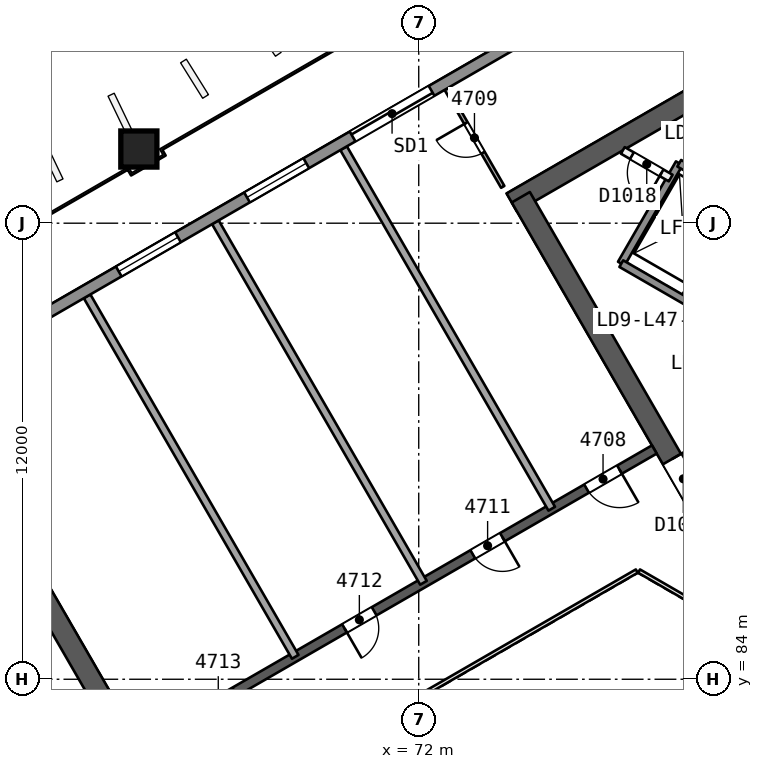
"""IFC4 building model, lengths in metres.
Left out: names, types, materials, properties, quantities, classifications, styles, units other than length and angle.
Written with IfcOpenShell. Run it as: python <this file> out.ifc"""

import sys

from ifc_helpers import new_model, si_unit, direction, frame, frame_2d, origin, origin_2d, place, context, subcontext, project, spatial, rectangle, extrude, element, fill, save


model = new_model("IFC4")
c1 = context("Model", 3, precision=1e-05, world=origin(), true_north=direction((0.0, 1.0)))
c2 = subcontext(c1, "Body", "Model", "MODEL_VIEW")
j1 = project(units=[si_unit("LENGTHUNIT", "METRE"), si_unit("PLANEANGLEUNIT", "RADIAN")], contexts=[c1])
p1 = place(None, origin())
s1 = spatial("IfcSite", under=j1, at=p1, CompositionType="ELEMENT")
p2 = place(p1, origin())
s2 = spatial("IfcBuilding", under=s1, at=p2, CompositionType="ELEMENT")
p3 = place(p2, frame((0.0, 0.0, 193.3)))
s3 = spatial("IfcBuildingStorey", under=s2, at=p3, CompositionType="ELEMENT", Elevation=193.3)
p4 = place(p3, frame((65.682, 80.0, 0.0), z_axis=(0.0, 0.0, 1.0), x_axis=(-0.500000202252, 0.866025287014, 0.0)))
e1 = element("IfcWall", 1, at=p4, inside=s3, PredefinedType="SHEAR", context=c2, shape_type="SweptSolid", body=[
    extrude(rectangle(XDim=10.221, YDim=0.55, at=frame_2d((5.111, 0.0))), origin(), (0.0, 0.0, 1.0), 3.7),
])
p5 = place(p4, frame((0.791, 0.0, 0.0)))
e2 = element("IfcOpeningElement", 2, at=p5, cuts=e1, PredefinedType="OPENING", context=c2, shape_type="SweptSolid", body=[
    extrude(rectangle(XDim=1.2, YDim=2.1, at=frame_2d((0.6, 1.05))), frame((0.0, 0.286, 0.0), z_axis=(0.0, -1.0, 0.0), x_axis=(1.0, 0.0, 0.0)), (0.0, 0.0, 1.0), 0.571),
])
p6 = place(p3, frame((86.723, 103.633, 0.0), z_axis=(0.0, 0.0, 1.0), x_axis=(-0.866023530946, -0.500003243837, 0.0)))
e3 = element("IfcWall", 3, at=p6, inside=s3, PredefinedType="SHEAR", context=c2, shape_type="SweptSolid", body=[
    extrude(rectangle(XDim=14.175, YDim=0.55, at=frame_2d((7.087, 0.0))), origin(), (0.0, 0.0, 1.0), 3.7),
])
p7 = place(p3, frame((74.686, 96.683, 0.0), z_axis=(0.0, 0.0, 1.0), x_axis=(0.499997818338, -0.866026663364, 0.0)))
e4 = element("IfcWall", 4, at=p7, inside=s3, PredefinedType="SHEAR", context=c2, shape_type="SweptSolid", body=[
    extrude(rectangle(XDim=10.105, YDim=0.55, at=frame_2d((5.052, 0.0))), origin(), (0.0, 0.0, 1.0), 3.7),
])
p8 = place(p7, frame((7.955, 0.0, 0.0)))
e5 = element("IfcOpeningElement", 5, at=p8, cuts=e4, PredefinedType="OPENING", context=c2, shape_type="SweptSolid", body=[
    extrude(rectangle(XDim=1.2, YDim=2.1, at=frame_2d((0.6, 1.05))), frame((0.0, 0.286, 0.0), z_axis=(0.0, -1.0, 0.0), x_axis=(1.0, 0.0, 0.0)), (0.0, 0.0, 1.0), 0.571),
])
p9 = place(p3, frame((78.2, 90.046, 0.0), z_axis=(0.0, 0.0, 1.0), x_axis=(-0.866026492143, -0.499998114903, 0.0)))
e6 = element("IfcWall", 6, at=p9, inside=s3, PredefinedType="SHEAR", context=c2, shape_type="SweptSolid", body=[
    extrude(rectangle(XDim=15.588, YDim=0.25, at=frame_2d((7.794, 0.0))), origin(), (0.0, 0.0, 1.0), 3.3),
])
p10 = place(p9, frame((1.059, 0.0, 0.0)))
e7 = element("IfcOpeningElement", 7, at=p10, cuts=e6, PredefinedType="OPENING", context=c2, shape_type="SweptSolid", body=[
    extrude(rectangle(XDim=1.0, YDim=2.1, at=frame_2d((0.5, 1.05))), frame((0.0, 0.135, 0.0), z_axis=(0.0, -1.0, 0.0), x_axis=(1.0, 0.0, 0.0)), (0.0, 0.0, 1.0), 0.271),
])
p11 = place(p9, frame((4.616, 0.0, 0.0)))
e8 = element("IfcOpeningElement", 8, at=p11, cuts=e6, PredefinedType="OPENING", context=c2, shape_type="SweptSolid", body=[
    extrude(rectangle(XDim=0.9, YDim=2.1, at=frame_2d((0.45, 1.05))), frame((0.0, 0.135, 0.0), z_axis=(0.0, -1.0, 0.0), x_axis=(1.0, 0.0, 0.0)), (0.0, 0.0, 1.0), 0.271),
])
p12 = place(p9, frame((8.513, 0.0, 0.0)))
e9 = element("IfcOpeningElement", 9, at=p12, cuts=e6, PredefinedType="OPENING", context=c2, shape_type="SweptSolid", body=[
    extrude(rectangle(XDim=0.9, YDim=2.1, at=frame_2d((0.45, 1.05))), frame((0.0, 0.135, 0.0), z_axis=(0.0, -1.0, 0.0), x_axis=(1.0, 0.0, 0.0)), (0.0, 0.0, 1.0), 0.271),
])
p13 = place(p9, frame((12.75, 0.0, 0.0)))
e10 = element("IfcOpeningElement", 10, at=p13, cuts=e6, PredefinedType="OPENING", context=c2, shape_type="SweptSolid", body=[
    extrude(rectangle(XDim=1.0, YDim=2.1, at=frame_2d((0.5, 1.05))), frame((0.0, 0.135, 0.0), z_axis=(0.0, -1.0, 0.0), x_axis=(1.0, 0.0, 0.0)), (0.0, 0.0, 1.0), 0.271),
])
p14 = place(p3, frame((64.624, 97.973, 0.0), z_axis=(0.010093620709, -0.017482414954, 0.999796221231), x_axis=(0.866020200589, 0.50000901209, 8.5616e-08)))
e11 = element("IfcColumn", 11, at=p14, inside=s3, PredefinedType="COLUMN", context=c2, shape_type="SweptSolid", body=[
    extrude(rectangle(XDim=0.95, YDim=0.95, at=origin_2d()), origin(), (0.0, 0.0, 1.0), 3.701),
])
p15 = place(p3, frame((74.21, 96.956, 0.0), z_axis=(0.0, 0.0, 1.0), x_axis=(-0.49997816789, 0.866038008192, 0.0)))
e12 = element("IfcWall", 12, at=p15, inside=s3, PredefinedType="PARTITIONING", context=c2, shape_type="SweptSolid", body=[
    extrude(rectangle(XDim=2.975, YDim=0.1, at=frame_2d((1.488, 0.0))), origin(), (0.0, 0.0, 1.0), 3.3),
])
p16 = place(p15, frame((1.038, 0.0, 0.0)))
e13 = element("IfcOpeningElement", 13, at=p16, cuts=e12, PredefinedType="OPENING", context=c2, shape_type="SweptSolid", body=[
    extrude(rectangle(XDim=0.9, YDim=2.1, at=frame_2d((0.45, 1.05))), frame((0.0, 0.061, 0.0), z_axis=(0.0, -1.0, 0.0), x_axis=(1.0, 0.0, 0.0)), (0.0, 0.0, 1.0), 0.121),
])
for number, where, z_axis, x_axis in (
    (14, (70.023, 97.974, 0.0), (0.0, 0.0, 1.0), (0.5, -0.866, 0.0)),
    (15, (66.648, 96.025, 0.0), (0.0, 0.0, 1.0), (0.5, -0.866, 0.0)),
    (16, (63.273, 94.076, 0.0), (0.0, 0.0, 1.0), (0.5, -0.866, 0.0)),
):
    element("IfcWall", number, at=place(p3, frame(where, z_axis=z_axis, x_axis=x_axis)), inside=s3, PredefinedType="PARTITIONING", context=c2, shape_type="SweptSolid", body=[
        extrude(rectangle(XDim=10.954, YDim=0.2, at=frame_2d((5.477, 0.0))), origin(), (0.0, 0.0, 1.0), 3.3),
    ])
p17 = place(p3, frame((43.232, 82.678, 0.0), z_axis=(0.0, 0.0, 1.0), x_axis=(0.866025125259, 0.500000482419, 0.0)))
e17 = element("IfcWall", 17, at=p17, inside=s3, PredefinedType="SOLIDWALL", context=c2, shape_type="SweptSolid", body=[
    extrude(rectangle(XDim=52.347, YDim=0.3, at=frame_2d((26.173, 0.0))), origin(), (0.0, 0.0, 1.0), 3.3),
])
p18 = place(p17, frame((31.209, 0.0, 0.0)))
e18 = element("IfcOpeningElement", 18, at=p18, cuts=e17, PredefinedType="OPENING", context=c2, shape_type="SweptSolid", body=[
    extrude(rectangle(XDim=2.4, YDim=2.4, at=frame_2d((1.2, 1.2))), frame((0.0, 0.161, 0.0), z_axis=(0.0, -1.0, 0.0), x_axis=(1.0, 0.0, 0.0)), (0.0, 0.0, 1.0), 0.321),
])
p19 = place(p17, frame((40.7, 0.0, 0.0)))
e19 = element("IfcOpeningElement", 19, at=p19, cuts=e17, PredefinedType="OPENING", context=c2, shape_type="SweptSolid", body=[
    extrude(rectangle(XDim=2.4, YDim=2.4, at=frame_2d((1.2, 1.2))), frame((0.0, 0.161, 0.0), z_axis=(0.0, -1.0, 0.0), x_axis=(1.0, 0.0, 0.0)), (0.0, 0.0, 1.0), 0.321),
])
p20 = place(p17, frame((19.517, 0.0, 0.0)))
e20 = element("IfcOpeningElement", 20, at=p20, cuts=e17, PredefinedType="OPENING", context=c2, shape_type="SweptSolid", body=[
    extrude(rectangle(XDim=2.4, YDim=2.4, at=frame_2d((1.2, 1.2))), frame((0.0, 0.161, 0.0), z_axis=(0.0, -1.0, 0.0), x_axis=(1.0, 0.0, 0.0)), (0.0, 0.0, 1.0), 0.321),
])
p21 = place(p17, frame((9.27, 0.0, 0.0)))
e21 = element("IfcOpeningElement", 21, at=p21, cuts=e17, PredefinedType="OPENING", context=c2, shape_type="SweptSolid", body=[
    extrude(rectangle(XDim=2.4, YDim=2.4, at=frame_2d((1.2, 1.2))), frame((0.0, 0.161, 0.0), z_axis=(0.0, -1.0, 0.0), x_axis=(1.0, 0.0, 0.0)), (0.0, 0.0, 1.0), 0.321),
])
p22 = place(p17, frame((28.001, 0.0, 0.9)))
e22 = element("IfcOpeningElement", 22, at=p22, cuts=e17, PredefinedType="OPENING", context=c2, shape_type="SweptSolid", body=[
    extrude(rectangle(XDim=1.8, YDim=1.5, at=frame_2d((0.9, 0.75))), frame((0.0, 0.161, 0.0), z_axis=(0.0, -1.0, 0.0), x_axis=(1.0, 0.0, 0.0)), (0.0, 0.0, 1.0), 0.321),
])
p23 = place(p17, frame((24.104, 0.0, 0.9)))
e23 = element("IfcOpeningElement", 23, at=p23, cuts=e17, PredefinedType="OPENING", context=c2, shape_type="SweptSolid", body=[
    extrude(rectangle(XDim=1.8, YDim=1.5, at=frame_2d((0.9, 0.75))), frame((0.0, 0.161, 0.0), z_axis=(0.0, -1.0, 0.0), x_axis=(1.0, 0.0, 0.0)), (0.0, 0.0, 1.0), 0.321),
])
for number, where, z_axis, x_axis in (
    (24, (78.976, 93.986, 0.0), (0.0, 0.0, 1.0), (0.5, 0.866, 0.0)),
    (25, (77.33, 94.936, 0.0), (0.0, 0.0, 1.0), (0.5, 0.866, 0.0)),
):
    element("IfcWall", number, at=place(p3, frame(where, z_axis=z_axis, x_axis=x_axis)), inside=s3, PredefinedType="SOLIDWALL", context=c2, shape_type="SweptSolid", body=[
        extrude(rectangle(XDim=3.05, YDim=0.2, at=frame_2d((1.525, 0.0))), origin(), (0.0, 0.0, 1.0), 3.3),
    ])
p24 = place(p3, frame((86.77, 89.486, 0.0), z_axis=(0.0, 0.0, 1.0), x_axis=(-0.86601811187, 0.500012629753, 0.0)))
e26 = element("IfcWall", 26, at=p24, inside=s3, PredefinedType="SOLIDWALL", context=c2, shape_type="SweptSolid", body=[
    extrude(rectangle(XDim=10.9, YDim=0.2, at=frame_2d((5.45, 0.0))), origin(), (0.0, 0.0, 1.0), 3.3),
])
p25 = place(p24, frame((0.575, 0.0, 0.0)))
e27 = element("IfcOpeningElement", 27, at=p25, cuts=e26, PredefinedType="OPENING", context=c2, shape_type="SweptSolid", body=[
    extrude(rectangle(XDim=1.1, YDim=2.1, at=frame_2d((0.55, 1.05))), frame((0.0, 0.11, 0.0), z_axis=(0.0, -1.0, 0.0), x_axis=(1.0, 0.0, 0.0)), (0.0, 0.0, 1.0), 0.221),
])
p26 = place(p24, frame((2.825, 0.0, 0.0)))
e28 = element("IfcOpeningElement", 28, at=p26, cuts=e26, PredefinedType="OPENING", context=c2, shape_type="SweptSolid", body=[
    extrude(rectangle(XDim=1.1, YDim=2.1, at=frame_2d((0.55, 1.05))), frame((0.0, 0.11, 0.0), z_axis=(0.0, -1.0, 0.0), x_axis=(1.0, 0.0, 0.0)), (0.0, 0.0, 1.0), 0.221),
])
p27 = place(p24, frame((5.075, 0.0, 0.0)))
e29 = element("IfcOpeningElement", 29, at=p27, cuts=e26, PredefinedType="OPENING", context=c2, shape_type="SweptSolid", body=[
    extrude(rectangle(XDim=1.1, YDim=2.1, at=frame_2d((0.55, 1.05))), frame((0.0, 0.11, 0.0), z_axis=(0.0, -1.0, 0.0), x_axis=(1.0, 0.0, 0.0)), (0.0, 0.0, 1.0), 0.221),
])
p28 = place(p24, frame((7.325, 0.0, 0.0)))
e30 = element("IfcOpeningElement", 30, at=p28, cuts=e26, PredefinedType="OPENING", context=c2, shape_type="SweptSolid", body=[
    extrude(rectangle(XDim=1.1, YDim=2.1, at=frame_2d((0.55, 1.05))), frame((0.0, 0.11, 0.0), z_axis=(0.0, -1.0, 0.0), x_axis=(1.0, 0.0, 0.0)), (0.0, 0.0, 1.0), 0.221),
])
p29 = place(p3, frame((78.63, 97.188, 0.0), z_axis=(0.0, 0.0, 1.0), x_axis=(-0.866003949776, 0.500037157592, 0.0)))
e31 = element("IfcWall", 31, at=p29, inside=s3, PredefinedType="PARTITIONING", context=c2, shape_type="SweptSolid", body=[
    extrude(rectangle(XDim=1.455, YDim=0.2, at=frame_2d((0.728, 0.0))), origin(), (0.0, 0.0, 1.0), 3.3),
])
p30 = place(p29, frame((0.278, 0.0, 0.0)))
e32 = element("IfcOpeningElement", 32, at=p30, cuts=e31, PredefinedType="OPENING", context=c2, shape_type="SweptSolid", body=[
    extrude(rectangle(XDim=0.9, YDim=2.1, at=frame_2d((0.45, 1.05))), frame((0.0, 0.11, 0.0), z_axis=(0.0, -1.0, 0.0), x_axis=(1.0, 0.0, 0.0)), (0.0, 0.0, 1.0), 0.221),
])
p31 = place(p3, frame((80.5, 96.627, 0.0), z_axis=(0.0, 0.0, 1.0), x_axis=(-0.86601224135, 0.500022797313, 0.0)))
e33 = element("IfcWall", 33, at=p31, inside=s3, PredefinedType="SOLIDWALL", context=c2, shape_type="SweptSolid", body=[
    extrude(rectangle(XDim=1.9, YDim=0.2, at=frame_2d((0.95, 0.0))), origin(), (0.0, 0.0, 1.0), 3.3),
])
p32 = place(p31, frame((0.4, 0.0, 0.0)))
e34 = element("IfcOpeningElement", 34, at=p32, cuts=e33, PredefinedType="OPENING", context=c2, shape_type="SweptSolid", body=[
    extrude(rectangle(XDim=1.1, YDim=2.1, at=frame_2d((0.55, 1.05))), frame((0.0, 0.11, 0.0), z_axis=(0.0, -1.0, 0.0), x_axis=(1.0, 0.0, 0.0)), (0.0, 0.0, 1.0), 0.221),
])
p33 = place(p3, frame((79.53, 85.846, 0.0), z_axis=(0.0, 0.0, 1.0), x_axis=(-0.866041268327, 0.499972520799, 0.0)))
e35 = element("IfcWall", 35, at=p33, inside=s3, PredefinedType="PARTITIONING", context=c2, shape_type="SweptSolid", body=[
    extrude(rectangle(XDim=2.0, YDim=0.1, at=frame_2d((1.0, 0.0))), origin(), (0.0, 0.0, 1.0), 3.3),
])
p34 = place(p3, frame((77.738, 86.846, 0.0), z_axis=(0.0, 0.0, 1.0), x_axis=(-0.866026658274, -0.499997827154, 0.0)))
e36 = element("IfcWall", 36, at=p34, inside=s3, PredefinedType="PARTITIONING", context=c2, shape_type="SweptSolid", body=[
    extrude(rectangle(XDim=11.588, YDim=0.1, at=frame_2d((5.794, 0.0))), origin(), (0.0, 0.0, 1.0), 3.3),
])
p35 = place(p10, origin())
e37 = element("IfcDoor", 37, at=p35, inside=s3, OperationType="SINGLE_SWING_LEFT", PredefinedType="NOTDEFINED", context=c2, shape_type="SweptSolid", body=[
    extrude(rectangle(XDim=1.0, YDim=2.1, at=frame_2d((0.5, 1.05))), frame((0.0, 0.025, 0.0), z_axis=(0.0, -1.0, 0.0), x_axis=(1.0, 0.0, 0.0)), (0.0, 0.0, 1.0), 0.05),
])
fill(e7, e37)
p36 = place(p16, origin())
e38 = element("IfcDoor", 38, at=p36, inside=s3, OperationType="SINGLE_SWING_RIGHT", PredefinedType="NOTDEFINED", context=c2, shape_type="SweptSolid", body=[
    extrude(rectangle(XDim=0.9, YDim=2.1, at=frame_2d((0.45, 1.05))), frame((0.0, 0.025, 0.0), z_axis=(0.0, -1.0, 0.0), x_axis=(1.0, 0.0, 0.0)), (0.0, 0.0, 1.0), 0.05),
])
fill(e13, e38)
p37 = place(p11, origin())
e39 = element("IfcDoor", 39, at=p37, inside=s3, OperationType="SINGLE_SWING_LEFT", PredefinedType="NOTDEFINED", context=c2, shape_type="SweptSolid", body=[
    extrude(rectangle(XDim=0.9, YDim=2.1, at=frame_2d((0.45, 1.05))), frame((0.0, 0.025, 0.0), z_axis=(0.0, -1.0, 0.0), x_axis=(1.0, 0.0, 0.0)), (0.0, 0.0, 1.0), 0.05),
])
fill(e8, e39)
p38 = place(p12, origin())
e40 = element("IfcDoor", 40, at=p38, inside=s3, OperationType="SINGLE_SWING_RIGHT", PredefinedType="NOTDEFINED", context=c2, shape_type="SweptSolid", body=[
    extrude(rectangle(XDim=0.9, YDim=2.1, at=frame_2d((0.45, 1.05))), frame((0.0, 0.025, 0.0), z_axis=(0.0, -1.0, 0.0), x_axis=(1.0, 0.0, 0.0)), (0.0, 0.0, 1.0), 0.05),
])
fill(e9, e40)
p39 = place(p18, origin())
e41 = element("IfcDoor", 41, at=p39, inside=s3, OperationType="SLIDING_TO_LEFT", PredefinedType="NOTDEFINED", context=c2, shape_type="SweptSolid", body=[
    extrude(rectangle(XDim=2.4, YDim=2.4, at=frame_2d((1.2, 1.2))), frame((0.0, 0.025, 0.0), z_axis=(0.0, -1.0, 0.0), x_axis=(1.0, 0.0, 0.0)), (0.0, 0.0, 1.0), 0.05),
])
fill(e18, e41)
p40 = place(p22, origin())
e42 = element("IfcWindow", 42, at=p40, inside=s3, PartitioningType="SINGLE_PANEL", PredefinedType="WINDOW", context=c2, shape_type="SweptSolid", body=[
    extrude(rectangle(XDim=1.8, YDim=1.5, at=frame_2d((0.9, 0.75))), frame((0.0, 0.03, 0.0), z_axis=(0.0, -1.0, 0.0), x_axis=(1.0, 0.0, 0.0)), (0.0, 0.0, 1.0), 0.06),
])
fill(e22, e42)
p41 = place(p23, origin())
e43 = element("IfcWindow", 43, at=p41, inside=s3, PartitioningType="SINGLE_PANEL", PredefinedType="WINDOW", context=c2, shape_type="SweptSolid", body=[
    extrude(rectangle(XDim=1.8, YDim=1.5, at=frame_2d((0.9, 0.75))), frame((0.0, 0.03, 0.0), z_axis=(0.0, -1.0, 0.0), x_axis=(1.0, 0.0, 0.0)), (0.0, 0.0, 1.0), 0.06),
])
fill(e23, e43)
p42 = place(p8, origin())
e44 = element("IfcDoor", 44, at=p42, inside=s3, OperationType="SINGLE_SWING_LEFT", PredefinedType="NOTDEFINED", context=c2, shape_type="SweptSolid", body=[
    extrude(rectangle(XDim=1.2, YDim=2.1, at=frame_2d((0.6, 1.05))), frame((0.0, 0.025, 0.0), z_axis=(0.0, -1.0, 0.0), x_axis=(1.0, 0.0, 0.0)), (0.0, 0.0, 1.0), 0.05),
])
fill(e5, e44)
p43 = place(p30, origin())
e45 = element("IfcDoor", 45, at=p43, inside=s3, OperationType="SINGLE_SWING_LEFT", PredefinedType="NOTDEFINED", context=c2, shape_type="SweptSolid", body=[
    extrude(rectangle(XDim=0.9, YDim=2.1, at=frame_2d((0.45, 1.05))), frame((0.0, 0.025, 0.0), z_axis=(0.0, -1.0, 0.0), x_axis=(1.0, 0.0, 0.0)), (0.0, 0.0, 1.0), 0.05),
])
fill(e32, e45)
save(model, sys.argv[1])
